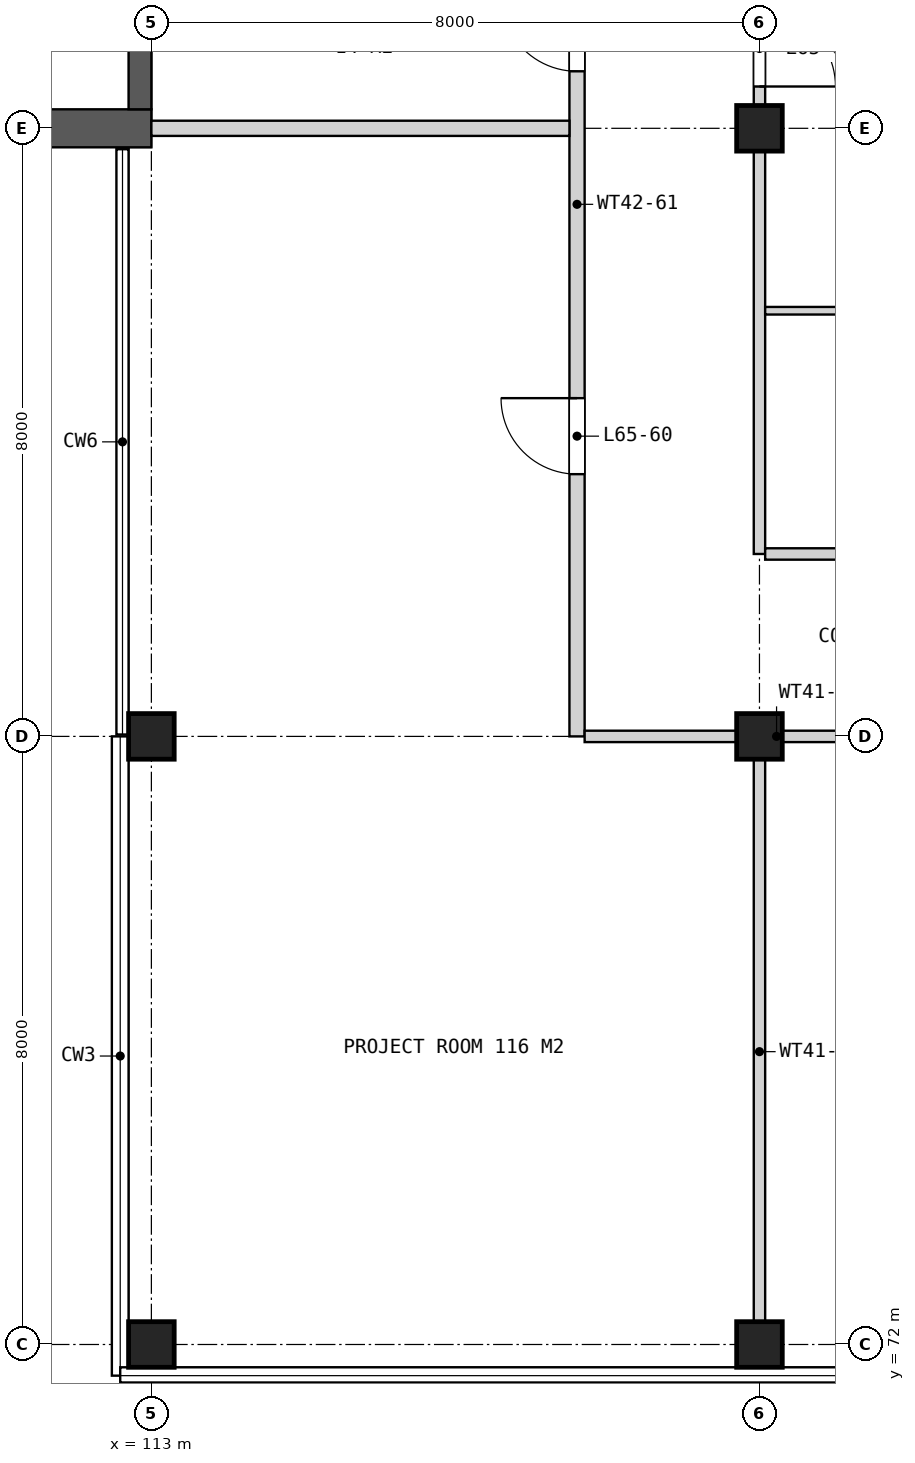
"""IFC4 building model, lengths in metres.
Left out: names, types, materials, properties, quantities, classifications, styles, units other than length and angle.
Written with IfcOpenShell. Run it as: python <this file> out.ifc"""

import sys

from ifc_helpers import new_model, si_unit, direction, frame, frame_2d, origin, origin_2d, place, context, subcontext, project, spatial, rectangle, extrude, element, fill, save


model = new_model("IFC4")
c1 = context("Model", 3, precision=1e-05, world=origin(), true_north=direction((0.0, 1.0)))
c2 = subcontext(c1, "Body", "Model", "MODEL_VIEW")
j1 = project(units=[si_unit("LENGTHUNIT", "METRE"), si_unit("PLANEANGLEUNIT", "RADIAN")], contexts=[c1])
p1 = place(None, origin())
s1 = spatial("IfcSite", under=j1, at=p1, CompositionType="ELEMENT")
p2 = place(p1, origin())
s2 = spatial("IfcBuilding", under=s1, at=p2, CompositionType="ELEMENT")
p3 = place(p2, frame((0.0, 0.0, 299.7)))
s3 = spatial("IfcBuildingStorey", under=s2, at=p3, CompositionType="ELEMENT", Elevation=299.7)
for number, where, z_axis, x_axis in (
    (1, (113.0, 72.0, 0.0), (0.0, 0.0, 1.0), (1.0, 0.0, 0.0)),
    (2, (113.0, 80.0, 0.0), (0.0, 0.0, 1.0), (1.0, 0.0, 0.0)),
    (3, (121.0, 72.0, 0.0), (0.0, 0.0, 1.0), (1.0, 0.0, 0.0)),
    (4, (121.0, 80.0, 0.0), (0.0, 0.0, 1.0), (1.0, 0.0, 0.0)),
    (5, (121.0, 88.0, 0.0), (0.0, 0.0, 1.0), (1.0, 0.0, 0.0)),
):
    element("IfcColumn", number, at=place(p3, frame(where, z_axis=z_axis, x_axis=x_axis)), inside=s3, PredefinedType="COLUMN", context=c2, shape_type="SweptSolid", body=[
        extrude(rectangle(XDim=0.6, YDim=0.6, at=origin_2d()), origin(), (0.0, 0.0, 1.0), 4.2),
    ])
p4 = place(p3, frame((113.0, 88.0, 0.0), z_axis=(0.0, 0.0, 1.0), x_axis=(-1.0, 0.0, 0.0)))
e6 = element("IfcWall", 6, at=p4, inside=s3, PredefinedType="SHEAR", context=c2, shape_type="SweptSolid", body=[
    extrude(rectangle(XDim=7.1, YDim=0.5, at=frame_2d((3.55, 0.0))), origin(), (0.0, 0.0, 1.0), 4.2),
])
p5 = place(p3, frame((112.85, 94.3, 0.0), z_axis=(0.0, 0.0, 1.0), x_axis=(0.0, -1.0, 0.0)))
e7 = element("IfcWall", 7, at=p5, inside=s3, PredefinedType="SHEAR", context=c2, shape_type="SweptSolid", body=[
    extrude(rectangle(XDim=6.05, YDim=0.3, at=frame_2d((3.025, 0.0))), origin(), (0.0, 0.0, 1.0), 4.2),
])
p6 = place(p3, frame((118.6, 80.0, 0.0), z_axis=(0.0, 0.0, 1.0), x_axis=(0.0, 1.0, 0.0)))
e8 = element("IfcWall", 8, at=p6, inside=s3, PredefinedType="SOLIDWALL", context=c2, shape_type="SweptSolid", body=[
    extrude(rectangle(XDim=14.0, YDim=0.2, at=frame_2d((7.0, 0.0))), origin(), (0.0, 0.0, 1.0), 3.255),
])
p7 = place(p6, frame((11.75, 0.0, 0.0)))
e9 = element("IfcOpeningElement", 9, at=p7, cuts=e8, PredefinedType="OPENING", context=c2, shape_type="SweptSolid", body=[
    extrude(rectangle(XDim=1.0, YDim=2.1, at=frame_2d((0.5, 1.05))), frame((0.0, 0.11, 0.0), z_axis=(0.0, -1.0, 0.0), x_axis=(1.0, 0.0, 0.0)), (0.0, 0.0, 1.0), 0.22),
])
p8 = place(p6, frame((8.75, 0.0, 0.0)))
e10 = element("IfcOpeningElement", 10, at=p8, cuts=e8, PredefinedType="OPENING", context=c2, shape_type="SweptSolid", body=[
    extrude(rectangle(XDim=1.0, YDim=2.1, at=frame_2d((0.5, 1.05))), frame((0.0, 0.11, 0.0), z_axis=(0.0, -1.0, 0.0), x_axis=(1.0, 0.0, 0.0)), (0.0, 0.0, 1.0), 0.22),
])
p9 = place(p6, frame((3.45, 0.0, 0.0)))
e11 = element("IfcOpeningElement", 11, at=p9, cuts=e8, PredefinedType="OPENING", context=c2, shape_type="SweptSolid", body=[
    extrude(rectangle(XDim=1.0, YDim=2.1, at=frame_2d((0.5, 1.05))), frame((0.0, 0.11, 0.0), z_axis=(0.0, -1.0, 0.0), x_axis=(1.0, 0.0, 0.0)), (0.0, 0.0, 1.0), 0.22),
])
p10 = place(p3, frame((121.0, 71.78, 0.0), z_axis=(0.0, 0.0, 1.0), x_axis=(0.0, 1.0, 0.0)))
e12 = element("IfcWall", 12, at=p10, inside=s3, PredefinedType="PARTITIONING", context=c2, shape_type="SweptSolid", body=[
    extrude(rectangle(XDim=8.145, YDim=0.15, at=frame_2d((4.073, 0.0))), origin(), (0.0, 0.0, 1.0), 3.255),
])
p11 = place(p3, frame((121.0, 82.4, 0.0), z_axis=(0.0, 0.0, 1.0), x_axis=(0.0, 1.0, 0.0)))
e13 = element("IfcWall", 13, at=p11, inside=s3, PredefinedType="PARTITIONING", context=c2, shape_type="SweptSolid", body=[
    extrude(rectangle(XDim=35.2, YDim=0.15, at=frame_2d((17.6, 0.0))), origin(), (0.0, 0.0, 1.0), 3.255),
])
p12 = place(p11, frame((6.15, 0.0, 0.0)))
e14 = element("IfcOpeningElement", 14, at=p12, cuts=e13, PredefinedType="OPENING", context=c2, shape_type="SweptSolid", body=[
    extrude(rectangle(XDim=1.0, YDim=2.1, at=frame_2d((0.5, 1.05))), frame((0.0, 0.085, 0.0), z_axis=(0.0, -1.0, 0.0), x_axis=(1.0, 0.0, 0.0)), (0.0, 0.0, 1.0), 0.17),
])
p13 = place(p11, frame((10.75, 0.0, 0.0)))
e15 = element("IfcOpeningElement", 15, at=p13, cuts=e13, PredefinedType="OPENING", context=c2, shape_type="SweptSolid", body=[
    extrude(rectangle(XDim=1.0, YDim=2.1, at=frame_2d((0.5, 1.05))), frame((0.0, 0.085, 0.0), z_axis=(0.0, -1.0, 0.0), x_axis=(1.0, 0.0, 0.0)), (0.0, 0.0, 1.0), 0.17),
])
p14 = place(p11, frame((17.45, 0.0, 0.0)))
e16 = element("IfcOpeningElement", 16, at=p14, cuts=e13, PredefinedType="OPENING", context=c2, shape_type="SweptSolid", body=[
    extrude(rectangle(XDim=1.0, YDim=2.1, at=frame_2d((0.5, 1.05))), frame((0.0, 0.085, 0.0), z_axis=(0.0, -1.0, 0.0), x_axis=(1.0, 0.0, 0.0)), (0.0, 0.0, 1.0), 0.17),
])
p15 = place(p3, frame((118.7, 80.0, 0.0), z_axis=(0.0, 0.0, 1.0), x_axis=(1.0, 0.0, 0.0)))
e17 = element("IfcWall", 17, at=p15, inside=s3, PredefinedType="PARTITIONING", context=c2, shape_type="SweptSolid", body=[
    extrude(rectangle(XDim=12.625, YDim=0.15, at=frame_2d((6.312, 0.0))), origin(), (0.0, 0.0, 1.0), 3.255),
])
p16 = place(p15, frame((5.85, 0.0, 0.0)))
e18 = element("IfcOpeningElement", 18, at=p16, cuts=e17, PredefinedType="OPENING", context=c2, shape_type="SweptSolid", body=[
    extrude(rectangle(XDim=1.0, YDim=2.1, at=frame_2d((0.5, 1.05))), frame((0.0, 0.085, 0.0), z_axis=(0.0, -1.0, 0.0), x_axis=(1.0, 0.0, 0.0)), (0.0, 0.0, 1.0), 0.17),
])
p17 = place(p3, frame((121.075, 82.4, 0.0), z_axis=(0.0, 0.0, 1.0), x_axis=(1.0, 0.0, 0.0)))
e19 = element("IfcWall", 19, at=p17, inside=s3, PredefinedType="PARTITIONING", context=c2, shape_type="SweptSolid", body=[
    extrude(rectangle(XDim=7.85, YDim=0.15, at=frame_2d((3.925, 0.0))), origin(), (0.0, 0.0, 1.0), 3.255),
])
p18 = place(p17, frame((3.45, 0.0, 0.0)))
e20 = element("IfcOpeningElement", 20, at=p18, cuts=e19, PredefinedType="OPENING", context=c2, shape_type="SweptSolid", body=[
    extrude(rectangle(XDim=1.0, YDim=2.1, at=frame_2d((0.5, 1.05))), frame((0.0, 0.085, 0.0), z_axis=(0.0, -1.0, 0.0), x_axis=(1.0, 0.0, 0.0)), (0.0, 0.0, 1.0), 0.17),
])
p19 = place(p3, frame((121.075, 85.6, 0.0), z_axis=(0.0, 0.0, 1.0), x_axis=(1.0, 0.0, 0.0)))
e21 = element("IfcWall", 21, at=p19, inside=s3, PredefinedType="PARTITIONING", context=c2, shape_type="SweptSolid", body=[
    extrude(rectangle(XDim=7.85, YDim=0.1, at=frame_2d((3.925, 0.0))), origin(), (0.0, 0.0, 1.0), 3.255),
])
p20 = place(p3, frame((113.0, 88.0, 0.0), z_axis=(0.0, 0.0, 1.0), x_axis=(1.0, 0.0, 0.0)))
e22 = element("IfcWall", 22, at=p20, inside=s3, PredefinedType="SOLIDWALL", context=c2, shape_type="SweptSolid", body=[
    extrude(rectangle(XDim=5.5, YDim=0.2, at=frame_2d((2.75, 0.0))), origin(), (0.0, 0.0, 1.0), 3.255),
])
p21 = place(p8, origin())
e23 = element("IfcDoor", 23, at=p21, inside=s3, OperationType="SINGLE_SWING_RIGHT", PredefinedType="DOOR", context=c2, shape_type="SweptSolid", body=[
    extrude(rectangle(XDim=1.0, YDim=2.1, at=frame_2d((0.5, 1.05))), frame((0.0, 0.025, 0.0), z_axis=(0.0, -1.0, 0.0), x_axis=(1.0, 0.0, 0.0)), (0.0, 0.0, 1.0), 0.05),
])
fill(e10, e23)
p22 = place(p9, origin())
e24 = element("IfcDoor", 24, at=p22, inside=s3, OperationType="SINGLE_SWING_RIGHT", PredefinedType="DOOR", context=c2, shape_type="SweptSolid", body=[
    extrude(rectangle(XDim=1.0, YDim=2.1, at=frame_2d((0.5, 1.05))), frame((0.0, 0.025, 0.0), z_axis=(0.0, -1.0, 0.0), x_axis=(1.0, 0.0, 0.0)), (0.0, 0.0, 1.0), 0.05),
])
fill(e11, e24)
p23 = place(p12, frame((1.0, 0.0, 0.0), z_axis=(0.0, 0.0, 1.0), x_axis=(-1.0, 0.0, 0.0)))
e25 = element("IfcDoor", 25, at=p23, inside=s3, OperationType="SINGLE_SWING_RIGHT", PredefinedType="DOOR", context=c2, shape_type="SweptSolid", body=[
    extrude(rectangle(XDim=1.0, YDim=2.1, at=frame_2d((0.5, 1.05))), frame((0.0, 0.025, 0.0), z_axis=(0.0, -1.0, 0.0), x_axis=(1.0, 0.0, 0.0)), (0.0, 0.0, 1.0), 0.05),
])
fill(e14, e25)
save(model, sys.argv[1])
